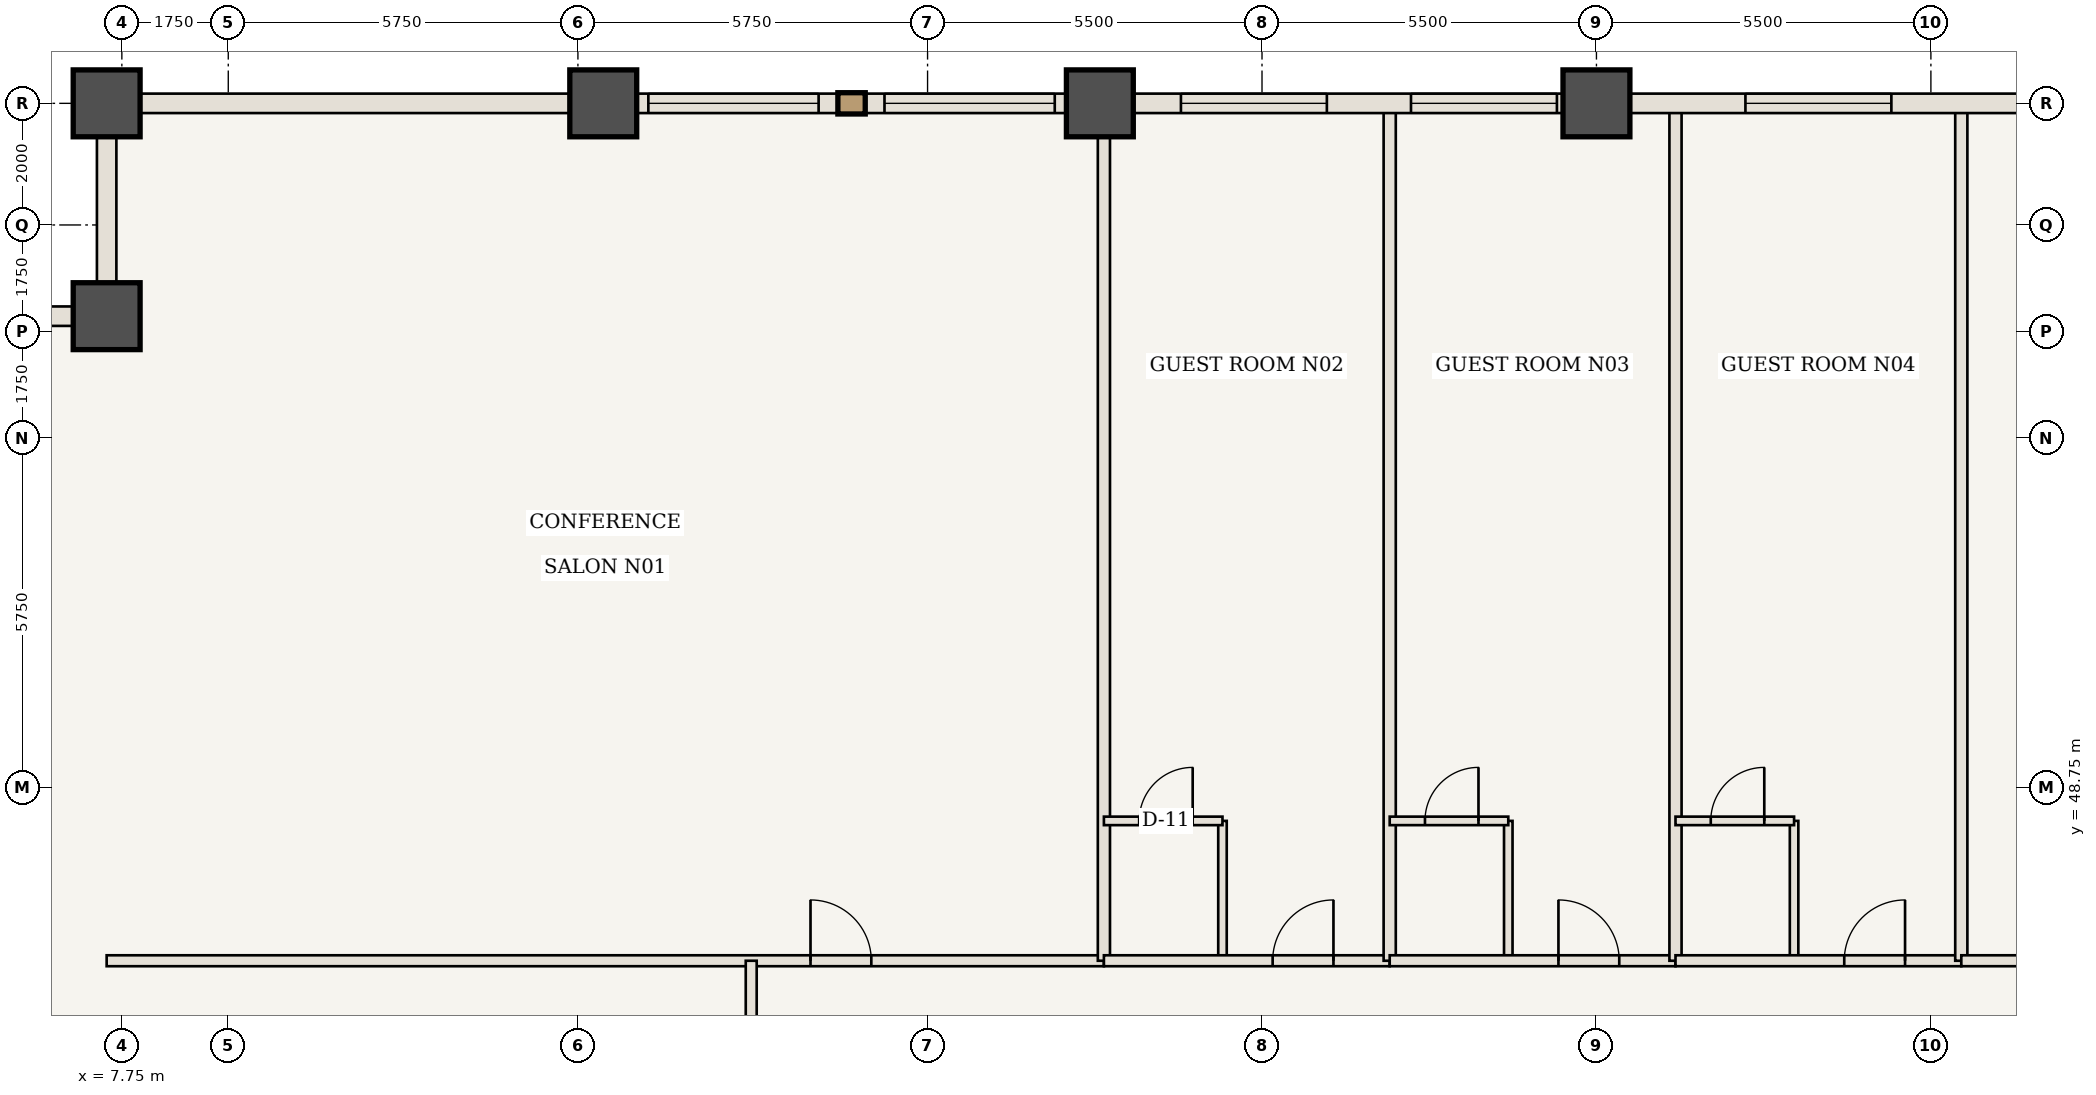
"""IFC4 building model, lengths in metres.
Left out: names, types, materials, properties, quantities, classifications, styles, units other than length and angle.
Written with IfcOpenShell. Run it as: python <this file> out.ifc"""

import sys

from ifc_helpers import new_model, si_unit, direction, frame, frame_2d, origin, origin_2d, place, context, subcontext, project, spatial, rectangle, extrude, element, fill, save


model = new_model("IFC4")
c1 = context("Model", 3, precision=1e-05, world=origin(), true_north=direction((0.0, 1.0)))
c2 = subcontext(c1, "Body", "Model", "MODEL_VIEW")
j1 = project(units=[si_unit("LENGTHUNIT", "METRE"), si_unit("PLANEANGLEUNIT", "RADIAN")], contexts=[c1])
p1 = place(None, origin())
s1 = spatial("IfcSite", under=j1, at=p1, CompositionType="ELEMENT")
p2 = place(p1, origin())
s2 = spatial("IfcBuilding", under=s1, at=p2, CompositionType="ELEMENT")
p3 = place(p2, frame((0.0, 0.0, 49.35)))
s3 = spatial("IfcBuildingStorey", under=s2, at=p3, CompositionType="ELEMENT", Elevation=49.35)
for number, where, z_axis, x_axis in (
    (1, (7.5, 60.0, 0.0), (0.0, 0.0, 1.0), (1.0, 0.0, 0.0)),
    (2, (7.5, 56.5, 0.0), (0.0, 0.0, 1.0), (1.0, 0.0, 0.0)),
    (3, (15.667, 60.0, 0.0), (0.0, 0.0, 1.0), (1.0, 0.0, 0.0)),
    (4, (23.833, 60.0, 0.0), (0.0, 0.0, 1.0), (1.0, 0.0, 0.0)),
    (5, (32.0, 60.0, 0.0), (0.0, 0.0, 1.0), (1.0, 0.0, 0.0)),
):
    element("IfcColumn", number, at=place(p3, frame(where, z_axis=z_axis, x_axis=x_axis)), inside=s3, PredefinedType="COLUMN", context=c2, shape_type="SweptSolid", body=[
        extrude(rectangle(XDim=1.1, YDim=1.1, at=origin_2d()), origin(), (0.0, 0.0, 1.0), 3.5),
    ])
p4 = place(p3, frame((7.5, 45.9, 0.0), z_axis=(0.0, 0.0, 1.0), x_axis=(1.0, 0.0, 0.0)))
e6 = element("IfcWall", 6, at=p4, inside=s3, PredefinedType="STANDARD", context=c2, shape_type="SweptSolid", body=[
    extrude(rectangle(XDim=16.4, YDim=0.18, at=frame_2d((8.2, 0.0))), origin(), (0.0, 0.0, 1.0), 3.32),
])
p5 = place(p4, frame((11.575, 0.0, 0.0)))
e7 = element("IfcOpeningElement", 7, at=p5, cuts=e6, PredefinedType="OPENING", context=c2, shape_type="SweptSolid", body=[
    extrude(rectangle(XDim=1.0, YDim=2.15, at=frame_2d((0.5, 1.075))), frame((0.0, 0.1, 0.0), z_axis=(0.0, -1.0, 0.0), x_axis=(1.0, 0.0, 0.0)), (0.0, 0.0, 1.0), 0.2),
])
p6 = place(p3, frame((23.9, 45.9, 0.0), z_axis=(0.0, 0.0, 1.0), x_axis=(0.0, 1.0, 0.0)))
e8 = element("IfcWall", 8, at=p6, inside=s3, PredefinedType="STANDARD", context=c2, shape_type="SweptSolid", body=[
    extrude(rectangle(XDim=14.04, YDim=0.2, at=frame_2d((7.02, 0.0))), origin(), (0.0, 0.0, 1.0), 3.32),
])
p7 = place(p3, frame((25.85, 45.9, 0.0), z_axis=(0.0, 0.0, 1.0), x_axis=(0.0, 1.0, 0.0)))
e9 = element("IfcWall", 9, at=p7, inside=s3, PredefinedType="STANDARD", context=c2, shape_type="SweptSolid", body=[
    extrude(rectangle(XDim=2.3, YDim=0.14, at=frame_2d((1.15, 0.0))), origin(), (0.0, 0.0, 1.0), 3.32),
])
p8 = place(p3, frame((23.9, 48.2, 0.0), z_axis=(0.0, 0.0, 1.0), x_axis=(1.0, 0.0, 0.0)))
e10 = element("IfcWall", 10, at=p8, inside=s3, PredefinedType="STANDARD", context=c2, shape_type="SweptSolid", body=[
    extrude(rectangle(XDim=1.95, YDim=0.14, at=frame_2d((0.975, 0.0))), origin(), (0.0, 0.0, 1.0), 3.32),
])
p9 = place(p8, frame((0.58, 0.0, 0.0)))
e11 = element("IfcOpeningElement", 11, at=p9, cuts=e10, PredefinedType="OPENING", context=c2, shape_type="SweptSolid", body=[
    extrude(rectangle(XDim=0.88, YDim=2.1, at=frame_2d((0.44, 1.05))), frame((0.0, 0.08, 0.0), z_axis=(0.0, -1.0, 0.0), x_axis=(1.0, 0.0, 0.0)), (0.0, 0.0, 1.0), 0.16),
])
p10 = place(p3, frame((23.9, 45.9, 0.0), z_axis=(0.0, 0.0, 1.0), x_axis=(1.0, 0.0, 0.0)))
e12 = element("IfcWall", 12, at=p10, inside=s3, PredefinedType="STANDARD", context=c2, shape_type="SweptSolid", body=[
    extrude(rectangle(XDim=4.7, YDim=0.18, at=frame_2d((2.35, 0.0))), origin(), (0.0, 0.0, 1.0), 3.32),
])
p11 = place(p10, frame((2.775, 0.0, 0.0)))
e13 = element("IfcOpeningElement", 13, at=p11, cuts=e12, PredefinedType="OPENING", context=c2, shape_type="SweptSolid", body=[
    extrude(rectangle(XDim=1.0, YDim=2.15, at=frame_2d((0.5, 1.075))), frame((0.0, 0.1, 0.0), z_axis=(0.0, -1.0, 0.0), x_axis=(1.0, 0.0, 0.0)), (0.0, 0.0, 1.0), 0.2),
])
p12 = place(p3, frame((28.6, 45.9, 0.0), z_axis=(0.0, 0.0, 1.0), x_axis=(0.0, 1.0, 0.0)))
e14 = element("IfcWall", 14, at=p12, inside=s3, PredefinedType="STANDARD", context=c2, shape_type="SweptSolid", body=[
    extrude(rectangle(XDim=14.04, YDim=0.2, at=frame_2d((7.02, 0.0))), origin(), (0.0, 0.0, 1.0), 3.32),
])
p13 = place(p3, frame((30.55, 45.9, 0.0), z_axis=(0.0, 0.0, 1.0), x_axis=(0.0, 1.0, 0.0)))
e15 = element("IfcWall", 15, at=p13, inside=s3, PredefinedType="STANDARD", context=c2, shape_type="SweptSolid", body=[
    extrude(rectangle(XDim=2.3, YDim=0.14, at=frame_2d((1.15, 0.0))), origin(), (0.0, 0.0, 1.0), 3.32),
])
p14 = place(p3, frame((28.6, 48.2, 0.0), z_axis=(0.0, 0.0, 1.0), x_axis=(1.0, 0.0, 0.0)))
e16 = element("IfcWall", 16, at=p14, inside=s3, PredefinedType="STANDARD", context=c2, shape_type="SweptSolid", body=[
    extrude(rectangle(XDim=1.95, YDim=0.14, at=frame_2d((0.975, 0.0))), origin(), (0.0, 0.0, 1.0), 3.32),
])
p15 = place(p14, frame((0.58, 0.0, 0.0)))
e17 = element("IfcOpeningElement", 17, at=p15, cuts=e16, PredefinedType="OPENING", context=c2, shape_type="SweptSolid", body=[
    extrude(rectangle(XDim=0.88, YDim=2.1, at=frame_2d((0.44, 1.05))), frame((0.0, 0.08, 0.0), z_axis=(0.0, -1.0, 0.0), x_axis=(1.0, 0.0, 0.0)), (0.0, 0.0, 1.0), 0.16),
])
p16 = place(p3, frame((28.6, 45.9, 0.0), z_axis=(0.0, 0.0, 1.0), x_axis=(1.0, 0.0, 0.0)))
e18 = element("IfcWall", 18, at=p16, inside=s3, PredefinedType="STANDARD", context=c2, shape_type="SweptSolid", body=[
    extrude(rectangle(XDim=4.7, YDim=0.18, at=frame_2d((2.35, 0.0))), origin(), (0.0, 0.0, 1.0), 3.32),
])
p17 = place(p16, frame((2.775, 0.0, 0.0)))
e19 = element("IfcOpeningElement", 19, at=p17, cuts=e18, PredefinedType="OPENING", context=c2, shape_type="SweptSolid", body=[
    extrude(rectangle(XDim=1.0, YDim=2.15, at=frame_2d((0.5, 1.075))), frame((0.0, 0.1, 0.0), z_axis=(0.0, -1.0, 0.0), x_axis=(1.0, 0.0, 0.0)), (0.0, 0.0, 1.0), 0.2),
])
p18 = place(p3, frame((33.3, 45.9, 0.0), z_axis=(0.0, 0.0, 1.0), x_axis=(0.0, 1.0, 0.0)))
e20 = element("IfcWall", 20, at=p18, inside=s3, PredefinedType="STANDARD", context=c2, shape_type="SweptSolid", body=[
    extrude(rectangle(XDim=14.04, YDim=0.2, at=frame_2d((7.02, 0.0))), origin(), (0.0, 0.0, 1.0), 3.32),
])
p19 = place(p3, frame((35.25, 45.9, 0.0), z_axis=(0.0, 0.0, 1.0), x_axis=(0.0, 1.0, 0.0)))
e21 = element("IfcWall", 21, at=p19, inside=s3, PredefinedType="STANDARD", context=c2, shape_type="SweptSolid", body=[
    extrude(rectangle(XDim=2.3, YDim=0.14, at=frame_2d((1.15, 0.0))), origin(), (0.0, 0.0, 1.0), 3.32),
])
p20 = place(p3, frame((33.3, 48.2, 0.0), z_axis=(0.0, 0.0, 1.0), x_axis=(1.0, 0.0, 0.0)))
e22 = element("IfcWall", 22, at=p20, inside=s3, PredefinedType="STANDARD", context=c2, shape_type="SweptSolid", body=[
    extrude(rectangle(XDim=1.95, YDim=0.14, at=frame_2d((0.975, 0.0))), origin(), (0.0, 0.0, 1.0), 3.32),
])
p21 = place(p20, frame((0.58, 0.0, 0.0)))
e23 = element("IfcOpeningElement", 23, at=p21, cuts=e22, PredefinedType="OPENING", context=c2, shape_type="SweptSolid", body=[
    extrude(rectangle(XDim=0.88, YDim=2.1, at=frame_2d((0.44, 1.05))), frame((0.0, 0.08, 0.0), z_axis=(0.0, -1.0, 0.0), x_axis=(1.0, 0.0, 0.0)), (0.0, 0.0, 1.0), 0.16),
])
p22 = place(p3, frame((33.3, 45.9, 0.0), z_axis=(0.0, 0.0, 1.0), x_axis=(1.0, 0.0, 0.0)))
e24 = element("IfcWall", 24, at=p22, inside=s3, PredefinedType="STANDARD", context=c2, shape_type="SweptSolid", body=[
    extrude(rectangle(XDim=4.7, YDim=0.18, at=frame_2d((2.35, 0.0))), origin(), (0.0, 0.0, 1.0), 3.32),
])
p23 = place(p22, frame((2.775, 0.0, 0.0)))
e25 = element("IfcOpeningElement", 25, at=p23, cuts=e24, PredefinedType="OPENING", context=c2, shape_type="SweptSolid", body=[
    extrude(rectangle(XDim=1.0, YDim=2.15, at=frame_2d((0.5, 1.075))), frame((0.0, 0.1, 0.0), z_axis=(0.0, -1.0, 0.0), x_axis=(1.0, 0.0, 0.0)), (0.0, 0.0, 1.0), 0.2),
])
p24 = place(p3, frame((38.0, 45.9, 0.0), z_axis=(0.0, 0.0, 1.0), x_axis=(0.0, 1.0, 0.0)))
e26 = element("IfcWall", 26, at=p24, inside=s3, PredefinedType="STANDARD", context=c2, shape_type="SweptSolid", body=[
    extrude(rectangle(XDim=14.04, YDim=0.2, at=frame_2d((7.02, 0.0))), origin(), (0.0, 0.0, 1.0), 3.32),
])
p25 = place(p3, frame((38.0, 45.9, 0.0), z_axis=(0.0, 0.0, 1.0), x_axis=(1.0, 0.0, 0.0)))
e27 = element("IfcWall", 27, at=p25, inside=s3, PredefinedType="STANDARD", context=c2, shape_type="SweptSolid", body=[
    extrude(rectangle(XDim=18.5, YDim=0.18, at=frame_2d((9.25, 0.0))), origin(), (0.0, 0.0, 1.0), 3.32),
])
p26 = place(p25, frame((4.875, 0.0, 0.0)))
e28 = element("IfcOpeningElement", 28, at=p26, cuts=e27, PredefinedType="OPENING", context=c2, shape_type="SweptSolid", body=[
    extrude(rectangle(XDim=1.0, YDim=2.15, at=frame_2d((0.5, 1.075))), frame((0.0, 0.1, 0.0), z_axis=(0.0, -1.0, 0.0), x_axis=(1.0, 0.0, 0.0)), (0.0, 0.0, 1.0), 0.2),
])
p27 = place(p3, frame((18.1, 38.5, 0.0), z_axis=(0.0, 0.0, 1.0), x_axis=(0.0, 1.0, 0.0)))
e29 = element("IfcWall", 29, at=p27, inside=s3, PredefinedType="STANDARD", context=c2, shape_type="SweptSolid", body=[
    extrude(rectangle(XDim=7.4, YDim=0.18, at=frame_2d((3.7, 0.0))), origin(), (0.0, 0.0, 1.0), 3.32),
])
p28 = place(p27, frame((4.65, 0.0, 0.0)))
e30 = element("IfcOpeningElement", 30, at=p28, cuts=e29, PredefinedType="OPENING", context=c2, shape_type="SweptSolid", body=[
    extrude(rectangle(XDim=1.0, YDim=2.15, at=frame_2d((0.5, 1.075))), frame((0.0, 0.1, 0.0), z_axis=(0.0, -1.0, 0.0), x_axis=(1.0, 0.0, 0.0)), (0.0, 0.0, 1.0), 0.2),
])
p29 = place(p3, frame((7.5, 60.0, 0.0), z_axis=(0.0, 0.0, 1.0), x_axis=(1.0, 0.0, 0.0)))
e31 = element("IfcWall", 31, at=p29, inside=s3, PredefinedType="USERDEFINED", context=c2, shape_type="SweptSolid", body=[
    extrude(rectangle(XDim=8.167, YDim=0.32, at=frame_2d((4.083, 0.0))), origin(), (0.0, 0.0, 1.0), 2.52),
])
p30 = place(p3, frame((15.667, 60.0, 0.0), z_axis=(0.0, 0.0, 1.0), x_axis=(1.0, 0.0, 0.0)))
e32 = element("IfcWall", 32, at=p30, inside=s3, PredefinedType="USERDEFINED", context=c2, shape_type="SweptSolid", body=[
    extrude(rectangle(XDim=8.167, YDim=0.32, at=frame_2d((4.083, 0.0))), origin(), (0.0, 0.0, 1.0), 2.52),
])
p31 = place(p30, frame((0.742, 0.0, 0.85)))
e33 = element("IfcOpeningElement", 33, at=p31, cuts=e32, PredefinedType="OPENING", context=c2, shape_type="SweptSolid", body=[
    extrude(rectangle(XDim=2.8, YDim=1.47, at=frame_2d((1.4, 0.735))), frame((0.0, 0.17, 0.0), z_axis=(0.0, -1.0, 0.0), x_axis=(1.0, 0.0, 0.0)), (0.0, 0.0, 1.0), 0.34),
])
p32 = place(p30, frame((4.625, 0.0, 0.85)))
e34 = element("IfcOpeningElement", 34, at=p32, cuts=e32, PredefinedType="OPENING", context=c2, shape_type="SweptSolid", body=[
    extrude(rectangle(XDim=2.8, YDim=1.47, at=frame_2d((1.4, 0.735))), frame((0.0, 0.17, 0.0), z_axis=(0.0, -1.0, 0.0), x_axis=(1.0, 0.0, 0.0)), (0.0, 0.0, 1.0), 0.34),
])
p33 = place(p3, frame((23.833, 60.0, 0.0), z_axis=(0.0, 0.0, 1.0), x_axis=(1.0, 0.0, 0.0)))
e35 = element("IfcWall", 35, at=p33, inside=s3, PredefinedType="USERDEFINED", context=c2, shape_type="SweptSolid", body=[
    extrude(rectangle(XDim=8.167, YDim=0.32, at=frame_2d((4.083, 0.0))), origin(), (0.0, 0.0, 1.0), 2.52),
])
p34 = place(p33, frame((1.333, 0.0, 0.85)))
e36 = element("IfcOpeningElement", 36, at=p34, cuts=e35, PredefinedType="OPENING", context=c2, shape_type="SweptSolid", body=[
    extrude(rectangle(XDim=2.4, YDim=1.47, at=frame_2d((1.2, 0.735))), frame((0.0, 0.17, 0.0), z_axis=(0.0, -1.0, 0.0), x_axis=(1.0, 0.0, 0.0)), (0.0, 0.0, 1.0), 0.34),
])
p35 = place(p33, frame((5.117, 0.0, 0.85)))
e37 = element("IfcOpeningElement", 37, at=p35, cuts=e35, PredefinedType="OPENING", context=c2, shape_type="SweptSolid", body=[
    extrude(rectangle(XDim=2.4, YDim=1.47, at=frame_2d((1.2, 0.735))), frame((0.0, 0.17, 0.0), z_axis=(0.0, -1.0, 0.0), x_axis=(1.0, 0.0, 0.0)), (0.0, 0.0, 1.0), 0.34),
])
p36 = place(p3, frame((32.0, 60.0, 0.0), z_axis=(0.0, 0.0, 1.0), x_axis=(1.0, 0.0, 0.0)))
e38 = element("IfcWall", 38, at=p36, inside=s3, PredefinedType="USERDEFINED", context=c2, shape_type="SweptSolid", body=[
    extrude(rectangle(XDim=8.167, YDim=0.32, at=frame_2d((4.083, 0.0))), origin(), (0.0, 0.0, 1.0), 2.52),
])
p37 = place(p36, frame((2.45, 0.0, 0.85)))
e39 = element("IfcOpeningElement", 39, at=p37, cuts=e38, PredefinedType="OPENING", context=c2, shape_type="SweptSolid", body=[
    extrude(rectangle(XDim=2.4, YDim=1.47, at=frame_2d((1.2, 0.735))), frame((0.0, 0.17, 0.0), z_axis=(0.0, -1.0, 0.0), x_axis=(1.0, 0.0, 0.0)), (0.0, 0.0, 1.0), 0.34),
])
for number, where, z_axis, x_axis in (
    (40, (7.5, 56.5, 0.0), (0.0, 0.0, 1.0), (0.0, 1.0, 0.0)),
    (41, (4.0, 56.5, 0.0), (0.0, 0.0, 1.0), (1.0, 0.0, 0.0)),
):
    element("IfcWall", number, at=place(p3, frame(where, z_axis=z_axis, x_axis=x_axis)), inside=s3, PredefinedType="USERDEFINED", context=c2, shape_type="SweptSolid", body=[
        extrude(rectangle(XDim=3.5, YDim=0.32, at=frame_2d((1.75, 0.0))), origin(), (0.0, 0.0, 1.0), 2.52),
    ])
p38 = place(p5, origin())
e42 = element("IfcDoor", 42, at=p38, inside=s3, OperationType="SINGLE_SWING_LEFT", PredefinedType="DOOR", context=c2, shape_type="SweptSolid", body=[
    extrude(rectangle(XDim=1.0, YDim=2.15, at=frame_2d((0.5, 1.075))), frame((0.0, 0.025, 0.0), z_axis=(0.0, -1.0, 0.0), x_axis=(1.0, 0.0, 0.0)), (0.0, 0.0, 1.0), 0.05),
])
fill(e7, e42)
p39 = place(p9, origin())
e43 = element("IfcDoor", 43, at=p39, inside=s3, OperationType="SINGLE_SWING_RIGHT", PredefinedType="DOOR", context=c2, shape_type="SweptSolid", body=[
    extrude(rectangle(XDim=0.88, YDim=2.1, at=frame_2d((0.44, 1.05))), frame((0.0, 0.025, 0.0), z_axis=(0.0, -1.0, 0.0), x_axis=(1.0, 0.0, 0.0)), (0.0, 0.0, 1.0), 0.05),
])
fill(e11, e43)
p40 = place(p11, origin())
e44 = element("IfcDoor", 44, at=p40, inside=s3, OperationType="SINGLE_SWING_RIGHT", PredefinedType="DOOR", context=c2, shape_type="SweptSolid", body=[
    extrude(rectangle(XDim=1.0, YDim=2.15, at=frame_2d((0.5, 1.075))), frame((0.0, 0.025, 0.0), z_axis=(0.0, -1.0, 0.0), x_axis=(1.0, 0.0, 0.0)), (0.0, 0.0, 1.0), 0.05),
])
fill(e13, e44)
p41 = place(p15, origin())
e45 = element("IfcDoor", 45, at=p41, inside=s3, OperationType="SINGLE_SWING_RIGHT", PredefinedType="DOOR", context=c2, shape_type="SweptSolid", body=[
    extrude(rectangle(XDim=0.88, YDim=2.1, at=frame_2d((0.44, 1.05))), frame((0.0, 0.025, 0.0), z_axis=(0.0, -1.0, 0.0), x_axis=(1.0, 0.0, 0.0)), (0.0, 0.0, 1.0), 0.05),
])
fill(e17, e45)
p42 = place(p17, origin())
e46 = element("IfcDoor", 46, at=p42, inside=s3, OperationType="SINGLE_SWING_LEFT", PredefinedType="DOOR", context=c2, shape_type="SweptSolid", body=[
    extrude(rectangle(XDim=1.0, YDim=2.15, at=frame_2d((0.5, 1.075))), frame((0.0, 0.025, 0.0), z_axis=(0.0, -1.0, 0.0), x_axis=(1.0, 0.0, 0.0)), (0.0, 0.0, 1.0), 0.05),
])
fill(e19, e46)
p43 = place(p21, origin())
e47 = element("IfcDoor", 47, at=p43, inside=s3, OperationType="SINGLE_SWING_RIGHT", PredefinedType="DOOR", context=c2, shape_type="SweptSolid", body=[
    extrude(rectangle(XDim=0.88, YDim=2.1, at=frame_2d((0.44, 1.05))), frame((0.0, 0.025, 0.0), z_axis=(0.0, -1.0, 0.0), x_axis=(1.0, 0.0, 0.0)), (0.0, 0.0, 1.0), 0.05),
])
fill(e23, e47)
p44 = place(p23, origin())
e48 = element("IfcDoor", 48, at=p44, inside=s3, OperationType="SINGLE_SWING_RIGHT", PredefinedType="DOOR", context=c2, shape_type="SweptSolid", body=[
    extrude(rectangle(XDim=1.0, YDim=2.15, at=frame_2d((0.5, 1.075))), frame((0.0, 0.025, 0.0), z_axis=(0.0, -1.0, 0.0), x_axis=(1.0, 0.0, 0.0)), (0.0, 0.0, 1.0), 0.05),
])
fill(e25, e48)
p45 = place(p31, origin())
e49 = element("IfcWindow", 49, at=p45, inside=s3, PartitioningType="SINGLE_PANEL", PredefinedType="WINDOW", context=c2, shape_type="SweptSolid", body=[
    extrude(rectangle(XDim=2.8, YDim=1.47, at=frame_2d((1.4, 0.735))), frame((0.0, 0.03, 0.0), z_axis=(0.0, -1.0, 0.0), x_axis=(1.0, 0.0, 0.0)), (0.0, 0.0, 1.0), 0.06),
])
fill(e33, e49)
p46 = place(p32, origin())
e50 = element("IfcWindow", 50, at=p46, inside=s3, PartitioningType="SINGLE_PANEL", PredefinedType="WINDOW", context=c2, shape_type="SweptSolid", body=[
    extrude(rectangle(XDim=2.8, YDim=1.47, at=frame_2d((1.4, 0.735))), frame((0.0, 0.03, 0.0), z_axis=(0.0, -1.0, 0.0), x_axis=(1.0, 0.0, 0.0)), (0.0, 0.0, 1.0), 0.06),
])
fill(e34, e50)
p47 = place(p34, origin())
e51 = element("IfcWindow", 51, at=p47, inside=s3, PartitioningType="SINGLE_PANEL", PredefinedType="WINDOW", context=c2, shape_type="SweptSolid", body=[
    extrude(rectangle(XDim=2.4, YDim=1.47, at=frame_2d((1.2, 0.735))), frame((0.0, 0.03, 0.0), z_axis=(0.0, -1.0, 0.0), x_axis=(1.0, 0.0, 0.0)), (0.0, 0.0, 1.0), 0.06),
])
fill(e36, e51)
p48 = place(p35, origin())
e52 = element("IfcWindow", 52, at=p48, inside=s3, PartitioningType="SINGLE_PANEL", PredefinedType="WINDOW", context=c2, shape_type="SweptSolid", body=[
    extrude(rectangle(XDim=2.4, YDim=1.47, at=frame_2d((1.2, 0.735))), frame((0.0, 0.03, 0.0), z_axis=(0.0, -1.0, 0.0), x_axis=(1.0, 0.0, 0.0)), (0.0, 0.0, 1.0), 0.06),
])
fill(e37, e52)
p49 = place(p37, origin())
e53 = element("IfcWindow", 53, at=p49, inside=s3, PartitioningType="SINGLE_PANEL", PredefinedType="WINDOW", context=c2, shape_type="SweptSolid", body=[
    extrude(rectangle(XDim=2.4, YDim=1.47, at=frame_2d((1.2, 0.735))), frame((0.0, 0.03, 0.0), z_axis=(0.0, -1.0, 0.0), x_axis=(1.0, 0.0, 0.0)), (0.0, 0.0, 1.0), 0.06),
])
fill(e39, e53)
save(model, sys.argv[1])
